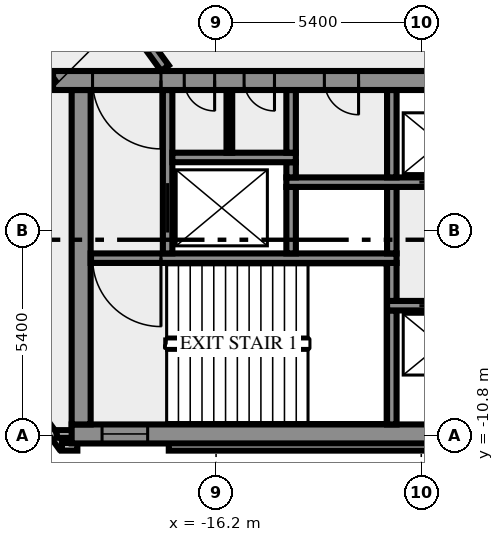
"""IFC4 building model, lengths in metres.
Left out: names, types, materials, properties, quantities, classifications, styles, units other than length and angle.
Written with IfcOpenShell. Run it as: python <this file> out.ifc"""

import sys

from ifc_helpers import new_model, si_unit, direction, frame, frame_2d, origin, place, context, subcontext, project, spatial, rectangle, extrude, element, fill, save


model = new_model("IFC4")
c1 = context("Model", 3, precision=1e-05, world=origin(), true_north=direction((0.0, 1.0)))
c2 = subcontext(c1, "Body", "Model", "MODEL_VIEW")
j1 = project(units=[si_unit("LENGTHUNIT", "METRE"), si_unit("PLANEANGLEUNIT", "RADIAN")], contexts=[c1])
p1 = place(None, origin())
s1 = spatial("IfcSite", under=j1, at=p1, CompositionType="ELEMENT")
p2 = place(p1, origin())
s2 = spatial("IfcBuilding", under=s1, at=p2, CompositionType="ELEMENT")
p3 = place(p2, frame((0.0, 0.0, 97.0)))
s3 = spatial("IfcBuildingStorey", under=s2, at=p3, CompositionType="ELEMENT", Elevation=97.0)
p4 = place(p3, frame((-21.833, -8.909, 0.0), z_axis=(0.0, 0.0, 1.0), x_axis=(0.587766567315, -0.809030569476, 0.0)))
e1 = element("IfcWall", 1, at=p4, inside=s3, PredefinedType="SOLIDWALL", context=c2, shape_type="SweptSolid", body=[
    extrude(rectangle(XDim=2.688, YDim=0.2, at=frame_2d((1.344, 0.0))), origin(), (0.0, 0.0, 1.0), 3.65),
])
p5 = place(p3, frame((-20.256, -11.088, 0.0), z_axis=(0.0, 0.0, 1.0), x_axis=(1.0, 0.0, 0.0)))
e2 = element("IfcWall", 2, at=p5, inside=s3, PredefinedType="SOLIDWALL", context=c2, shape_type="SweptSolid", body=[
    extrude(rectangle(XDim=0.406, YDim=0.2, at=frame_2d((0.203, 0.0))), origin(), (0.0, 0.0, 1.0), 3.65),
])
p6 = place(p3, frame((-17.444, -11.088, 0.0), z_axis=(0.0, 0.0, 1.0), x_axis=(1.0, 0.0, 0.0)))
e3 = element("IfcWall", 3, at=p6, inside=s3, PredefinedType="SOLIDWALL", context=c2, shape_type="SweptSolid", body=[
    extrude(rectangle(XDim=34.888, YDim=0.2, at=frame_2d((17.444, 0.0))), origin(), (0.0, 0.0, 1.0), 3.65),
])
p7 = place(p3, frame((-19.98, -10.75, 0.0), z_axis=(0.0, 0.0, 1.0), x_axis=(-1.0, 0.0, 0.0)))
e4 = element("IfcWall", 4, at=p7, inside=s3, PredefinedType="SOLIDWALL", context=c2, shape_type="SweptSolid", body=[
    extrude(rectangle(XDim=0.417, YDim=0.2, at=frame_2d((0.208, 0.0))), origin(), (0.0, 0.0, 1.0), 3.65),
])
p8 = place(p3, frame((-20.0, -10.75, 0.0), z_axis=(0.0, 0.0, 1.0), x_axis=(1.0, 0.0, 0.0)))
e5 = element("IfcWall", 5, at=p8, inside=s3, PredefinedType="SHEAR", context=c2, shape_type="SweptSolid", body=[
    extrude(rectangle(XDim=40.0, YDim=0.5, at=frame_2d((20.0, 0.0))), origin(), (0.0, 0.0, 1.0), 3.65),
])
p9 = place(p8, frame((0.8, 0.0, 1.0)))
e6 = element("IfcOpeningElement", 6, at=p9, cuts=e5, PredefinedType="OPENING", context=c2, shape_type="SweptSolid", body=[
    extrude(rectangle(XDim=1.2, YDim=1.2, at=frame_2d((0.6, 0.6))), frame((0.0, 0.26, 0.0), z_axis=(0.0, -1.0, 0.0), x_axis=(1.0, 0.0, 0.0)), (0.0, 0.0, 1.0), 0.52),
])
p10 = place(p8, frame((38.0, 0.0, 1.0)))
e7 = element("IfcOpeningElement", 7, at=p10, cuts=e5, PredefinedType="OPENING", context=c2, shape_type="SweptSolid", body=[
    extrude(rectangle(XDim=1.2, YDim=1.2, at=frame_2d((0.6, 0.6))), frame((0.0, 0.26, 0.0), z_axis=(0.0, -1.0, 0.0), x_axis=(1.0, 0.0, 0.0)), (0.0, 0.0, 1.0), 0.52),
])
p11 = place(p3, frame((-19.75, -10.5, 0.0), z_axis=(0.0, 0.0, 1.0), x_axis=(0.0, 1.0, 0.0)))
e8 = element("IfcWall", 8, at=p11, inside=s3, PredefinedType="SHEAR", context=c2, shape_type="SweptSolid", body=[
    extrude(rectangle(XDim=8.8, YDim=0.5, at=frame_2d((4.4, 0.0))), origin(), (0.0, 0.0, 1.0), 3.65),
])
p12 = place(p3, frame((-11.575, -10.5, 0.0), z_axis=(0.0, 0.0, 1.0), x_axis=(0.0, 1.0, 0.0)))
e9 = element("IfcWall", 9, at=p12, inside=s3, PredefinedType="SHEAR", context=c2, shape_type="SweptSolid", body=[
    extrude(rectangle(XDim=3.0, YDim=0.25, at=frame_2d((1.5, 0.0))), origin(), (0.0, 0.0, 1.0), 3.65),
])
p13 = place(p3, frame((11.7, -7.375, 0.0), z_axis=(0.0, 0.0, 1.0), x_axis=(-1.0, 0.0, 0.0)))
e10 = element("IfcWall", 10, at=p13, inside=s3, PredefinedType="SHEAR", context=c2, shape_type="SweptSolid", body=[
    extrude(rectangle(XDim=23.4, YDim=0.25, at=frame_2d((11.7, 0.0))), origin(), (0.0, 0.0, 1.0), 3.65),
])
p14 = place(p13, frame((21.45, 0.0, 0.0)))
e11 = element("IfcOpeningElement", 11, at=p14, cuts=e10, PredefinedType="OPENING", context=c2, shape_type="SweptSolid", body=[
    extrude(rectangle(XDim=1.1, YDim=2.1, at=frame_2d((0.55, 1.05))), frame((0.0, 0.135, 0.0), z_axis=(0.0, -1.0, 0.0), x_axis=(1.0, 0.0, 0.0)), (0.0, 0.0, 1.0), 0.27),
])
p15 = place(p13, frame((18.95, 0.0, 0.0)))
e12 = element("IfcOpeningElement", 12, at=p15, cuts=e10, PredefinedType="OPENING", context=c2, shape_type="SweptSolid", body=[
    extrude(rectangle(XDim=1.1, YDim=2.1, at=frame_2d((0.55, 1.05))), frame((0.0, 0.135, 0.0), z_axis=(0.0, -1.0, 0.0), x_axis=(1.0, 0.0, 0.0)), (0.0, 0.0, 1.0), 0.27),
])
p16 = place(p13, frame((16.45, 0.0, 0.0)))
e13 = element("IfcOpeningElement", 13, at=p16, cuts=e10, PredefinedType="OPENING", context=c2, shape_type="SweptSolid", body=[
    extrude(rectangle(XDim=1.1, YDim=2.1, at=frame_2d((0.55, 1.05))), frame((0.0, 0.135, 0.0), z_axis=(0.0, -1.0, 0.0), x_axis=(1.0, 0.0, 0.0)), (0.0, 0.0, 1.0), 0.27),
])
p17 = place(p13, frame((14.65, 0.0, 0.0)))
e14 = element("IfcOpeningElement", 14, at=p17, cuts=e10, PredefinedType="OPENING", context=c2, shape_type="SweptSolid", body=[
    extrude(rectangle(XDim=0.8, YDim=2.1, at=frame_2d((0.4, 1.05))), frame((0.0, 0.135, 0.0), z_axis=(0.0, -1.0, 0.0), x_axis=(1.0, 0.0, 0.0)), (0.0, 0.0, 1.0), 0.27),
])
p18 = place(p13, frame((12.8, 0.0, 0.0)))
e15 = element("IfcOpeningElement", 15, at=p18, cuts=e10, PredefinedType="OPENING", context=c2, shape_type="SweptSolid", body=[
    extrude(rectangle(XDim=0.9, YDim=2.1, at=frame_2d((0.45, 1.05))), frame((0.0, 0.135, 0.0), z_axis=(0.0, -1.0, 0.0), x_axis=(1.0, 0.0, 0.0)), (0.0, 0.0, 1.0), 0.27),
])
p19 = place(p13, frame((10.7, 0.0, 0.0)))
e16 = element("IfcOpeningElement", 16, at=p19, cuts=e10, PredefinedType="OPENING", context=c2, shape_type="SweptSolid", body=[
    extrude(rectangle(XDim=0.9, YDim=2.1, at=frame_2d((0.45, 1.05))), frame((0.0, 0.135, 0.0), z_axis=(0.0, -1.0, 0.0), x_axis=(1.0, 0.0, 0.0)), (0.0, 0.0, 1.0), 0.27),
])
p20 = place(p3, frame((-11.575, -7.25, 0.0), z_axis=(0.0, 0.0, 1.0), x_axis=(0.0, 1.0, 0.0)))
e17 = element("IfcWall", 17, at=p20, inside=s3, PredefinedType="SHEAR", context=c2, shape_type="SweptSolid", body=[
    extrude(rectangle(XDim=1.0, YDim=0.25, at=frame_2d((0.5, 0.0))), origin(), (0.0, 0.0, 1.0), 3.65),
])
p21 = place(p3, frame((-11.45, -6.125, 0.0), z_axis=(0.0, 0.0, 1.0), x_axis=(-1.0, 0.0, 0.0)))
e18 = element("IfcWall", 18, at=p21, inside=s3, PredefinedType="SHEAR", context=c2, shape_type="SweptSolid", body=[
    extrude(rectangle(XDim=8.05, YDim=0.25, at=frame_2d((4.025, 0.0))), origin(), (0.0, 0.0, 1.0), 3.65),
])
p22 = place(p21, frame((6.2, 0.0, 0.0)))
e19 = element("IfcOpeningElement", 19, at=p22, cuts=e18, PredefinedType="OPENING", context=c2, shape_type="SweptSolid", body=[
    extrude(rectangle(XDim=1.8, YDim=2.1, at=frame_2d((0.9, 1.05))), frame((0.0, 0.135, 0.0), z_axis=(0.0, -1.0, 0.0), x_axis=(1.0, 0.0, 0.0)), (0.0, 0.0, 1.0), 0.27),
])
p23 = place(p3, frame((-17.475, -6.0, 0.0), z_axis=(0.0, 0.0, 1.0), x_axis=(0.0, 1.0, 0.0)))
e20 = element("IfcWall", 20, at=p23, inside=s3, PredefinedType="SHEAR", context=c2, shape_type="SweptSolid", body=[
    extrude(rectangle(XDim=4.3, YDim=0.25, at=frame_2d((2.15, 0.0))), origin(), (0.0, 0.0, 1.0), 3.65),
])
p24 = place(p23, frame((0.55, 0.0, 0.0)))
e21 = element("IfcOpeningElement", 21, at=p24, cuts=e20, PredefinedType="OPENING", context=c2, shape_type="SweptSolid", body=[
    extrude(rectangle(XDim=1.3, YDim=2.1, at=frame_2d((0.65, 1.05))), frame((0.0, 0.135, 0.0), z_axis=(0.0, -1.0, 0.0), x_axis=(1.0, 0.0, 0.0)), (0.0, 0.0, 1.0), 0.27),
])
for number, where, z_axis, x_axis in (
    (22, (-14.225, -6.0, 0.0), (0.0, 0.0, 1.0), (0.0, 1.0, 0.0)),
    (23, (-11.575, -6.0, 0.0), (0.0, 0.0, 1.0), (0.0, 1.0, 0.0)),
):
    element("IfcWall", number, at=place(p3, frame(where, z_axis=z_axis, x_axis=x_axis)), inside=s3, PredefinedType="SHEAR", context=c2, shape_type="SweptSolid", body=[
        extrude(rectangle(XDim=1.75, YDim=0.25, at=frame_2d((0.875, 0.0))), origin(), (0.0, 0.0, 1.0), 3.65),
    ])
p25 = place(p3, frame((-14.35, -4.125, 0.0), z_axis=(0.0, 0.0, 1.0), x_axis=(1.0, 0.0, 0.0)))
e24 = element("IfcWall", 24, at=p25, inside=s3, PredefinedType="SHEAR", context=c2, shape_type="SweptSolid", body=[
    extrude(rectangle(XDim=12.7, YDim=0.25, at=frame_2d((6.35, 0.0))), origin(), (0.0, 0.0, 1.0), 3.65),
])
p26 = place(p25, frame((3.5, 0.0, 0.0)))
e25 = element("IfcOpeningElement", 25, at=p26, cuts=e24, PredefinedType="OPENING", context=c2, shape_type="SweptSolid", body=[
    extrude(rectangle(XDim=1.1, YDim=2.1, at=frame_2d((0.55, 1.05))), frame((0.0, 0.135, 0.0), z_axis=(0.0, -1.0, 0.0), x_axis=(1.0, 0.0, 0.0)), (0.0, 0.0, 1.0), 0.27),
])
p27 = place(p25, frame((6.0, 0.0, 0.0)))
e26 = element("IfcOpeningElement", 26, at=p27, cuts=e24, PredefinedType="OPENING", context=c2, shape_type="SweptSolid", body=[
    extrude(rectangle(XDim=1.1, YDim=2.1, at=frame_2d((0.55, 1.05))), frame((0.0, 0.135, 0.0), z_axis=(0.0, -1.0, 0.0), x_axis=(1.0, 0.0, 0.0)), (0.0, 0.0, 1.0), 0.27),
])
p28 = place(p25, frame((8.5, 0.0, 0.0)))
e27 = element("IfcOpeningElement", 27, at=p28, cuts=e24, PredefinedType="OPENING", context=c2, shape_type="SweptSolid", body=[
    extrude(rectangle(XDim=1.1, YDim=2.1, at=frame_2d((0.55, 1.05))), frame((0.0, 0.135, 0.0), z_axis=(0.0, -1.0, 0.0), x_axis=(1.0, 0.0, 0.0)), (0.0, 0.0, 1.0), 0.27),
])
p29 = place(p3, frame((-14.225, -4.0, 0.0), z_axis=(0.0, 0.0, 1.0), x_axis=(0.0, 1.0, 0.0)))
e28 = element("IfcWall", 28, at=p29, inside=s3, PredefinedType="SHEAR", context=c2, shape_type="SweptSolid", body=[
    extrude(rectangle(XDim=0.4, YDim=0.25, at=frame_2d((0.2, 0.0))), origin(), (0.0, 0.0, 1.0), 3.65),
])
p30 = place(p3, frame((-11.575, -4.0, 0.0), z_axis=(0.0, 0.0, 1.0), x_axis=(0.0, 1.0, 0.0)))
e29 = element("IfcWall", 29, at=p30, inside=s3, PredefinedType="SHEAR", context=c2, shape_type="SweptSolid", body=[
    extrude(rectangle(XDim=2.3, YDim=0.25, at=frame_2d((1.15, 0.0))), origin(), (0.0, 0.0, 1.0), 3.65),
])
p31 = place(p3, frame((-17.35, -3.475, 0.0), z_axis=(0.0, 0.0, 1.0), x_axis=(1.0, 0.0, 0.0)))
e30 = element("IfcWall", 30, at=p31, inside=s3, PredefinedType="SHEAR", context=c2, shape_type="SweptSolid", body=[
    extrude(rectangle(XDim=3.25, YDim=0.25, at=frame_2d((1.625, 0.0))), origin(), (0.0, 0.0, 1.0), 3.65),
])
p32 = place(p3, frame((-15.85, -3.35, 0.0), z_axis=(0.0, 0.0, 1.0), x_axis=(0.0, 1.0, 0.0)))
e31 = element("IfcWall", 31, at=p32, inside=s3, PredefinedType="PARTITIONING", context=c2, shape_type="SweptSolid", body=[
    extrude(rectangle(XDim=1.65, YDim=0.15, at=frame_2d((0.825, 0.0))), origin(), (0.0, 0.0, 1.0), 3.65),
])
p33 = place(p3, frame((-14.225, -3.35, 0.0), z_axis=(0.0, 0.0, 1.0), x_axis=(0.0, 1.0, 0.0)))
e32 = element("IfcWall", 32, at=p33, inside=s3, PredefinedType="SHEAR", context=c2, shape_type="SweptSolid", body=[
    extrude(rectangle(XDim=1.65, YDim=0.25, at=frame_2d((0.825, 0.0))), origin(), (0.0, 0.0, 1.0), 3.65),
])
p34 = place(p3, frame((20.49, -1.45, 0.0), z_axis=(0.0, 0.0, 1.0), x_axis=(-1.0, 0.0, 0.0)))
e33 = element("IfcWall", 33, at=p34, inside=s3, PredefinedType="SHEAR", context=c2, shape_type="SweptSolid", body=[
    extrude(rectangle(XDim=40.98, YDim=0.5, at=frame_2d((20.49, 0.0))), origin(), (0.0, 0.0, 1.0), 3.65),
])
p35 = place(p34, frame((38.14, 0.0, 0.0)))
e34 = element("IfcOpeningElement", 34, at=p35, cuts=e33, PredefinedType="OPENING", context=c2, shape_type="SweptSolid", body=[
    extrude(rectangle(XDim=1.8, YDim=2.1, at=frame_2d((0.9, 1.05))), frame((0.0, 0.26, 0.0), z_axis=(0.0, -1.0, 0.0), x_axis=(1.0, 0.0, 0.0)), (0.0, 0.0, 1.0), 0.52),
])
p36 = place(p34, frame((36.728, 0.0, 0.0)))
e35 = element("IfcOpeningElement", 35, at=p36, cuts=e33, PredefinedType="OPENING", context=c2, shape_type="SweptSolid", body=[
    extrude(rectangle(XDim=0.8, YDim=2.1, at=frame_2d((0.4, 1.05))), frame((0.0, 0.26, 0.0), z_axis=(0.0, -1.0, 0.0), x_axis=(1.0, 0.0, 0.0)), (0.0, 0.0, 1.0), 0.52),
])
p37 = place(p34, frame((35.153, 0.0, 0.0)))
e36 = element("IfcOpeningElement", 36, at=p37, cuts=e33, PredefinedType="OPENING", context=c2, shape_type="SweptSolid", body=[
    extrude(rectangle(XDim=0.8, YDim=2.1, at=frame_2d((0.4, 1.05))), frame((0.0, 0.26, 0.0), z_axis=(0.0, -1.0, 0.0), x_axis=(1.0, 0.0, 0.0)), (0.0, 0.0, 1.0), 0.52),
])
p38 = place(p34, frame((32.94, 0.0, 0.0)))
e37 = element("IfcOpeningElement", 37, at=p38, cuts=e33, PredefinedType="OPENING", context=c2, shape_type="SweptSolid", body=[
    extrude(rectangle(XDim=0.9, YDim=2.1, at=frame_2d((0.45, 1.05))), frame((0.0, 0.26, 0.0), z_axis=(0.0, -1.0, 0.0), x_axis=(1.0, 0.0, 0.0)), (0.0, 0.0, 1.0), 0.52),
])
p39 = place(p34, frame((19.59, 0.0, 0.0)))
e38 = element("IfcOpeningElement", 38, at=p39, cuts=e33, PredefinedType="OPENING", context=c2, shape_type="SweptSolid", body=[
    extrude(rectangle(XDim=2.0, YDim=2.1, at=frame_2d((1.0, 1.05))), frame((0.0, 0.26, 0.0), z_axis=(0.0, -1.0, 0.0), x_axis=(1.0, 0.0, 0.0)), (0.0, 0.0, 1.0), 0.52),
])
p40 = place(p34, frame((7.14, 0.0, 0.0)))
e39 = element("IfcOpeningElement", 39, at=p40, cuts=e33, PredefinedType="OPENING", context=c2, shape_type="SweptSolid", body=[
    extrude(rectangle(XDim=0.9, YDim=2.1, at=frame_2d((0.45, 1.05))), frame((0.0, 0.26, 0.0), z_axis=(0.0, -1.0, 0.0), x_axis=(1.0, 0.0, 0.0)), (0.0, 0.0, 1.0), 0.52),
])
p41 = place(p34, frame((4.19, 0.0, 0.0)))
e40 = element("IfcOpeningElement", 40, at=p41, cuts=e33, PredefinedType="OPENING", context=c2, shape_type="SweptSolid", body=[
    extrude(rectangle(XDim=0.9, YDim=2.1, at=frame_2d((0.45, 1.05))), frame((0.0, 0.26, 0.0), z_axis=(0.0, -1.0, 0.0), x_axis=(1.0, 0.0, 0.0)), (0.0, 0.0, 1.0), 0.52),
])
p42 = place(p34, frame((1.04, 0.0, 0.0)))
e41 = element("IfcOpeningElement", 41, at=p42, cuts=e33, PredefinedType="OPENING", context=c2, shape_type="SweptSolid", body=[
    extrude(rectangle(XDim=1.8, YDim=2.1, at=frame_2d((0.9, 1.05))), frame((0.0, 0.26, 0.0), z_axis=(0.0, -1.0, 0.0), x_axis=(1.0, 0.0, 0.0)), (0.0, 0.0, 1.0), 0.52),
])
p43 = place(p3, frame((-20.531, -1.523, 0.0), z_axis=(0.0, 0.0, 1.0), x_axis=(-0.587784593204, 0.809017473231, 0.0)))
e42 = element("IfcWall", 42, at=p43, inside=s3, PredefinedType="SOLIDWALL", context=c2, shape_type="SweptSolid", body=[
    extrude(rectangle(XDim=44.67, YDim=0.25, at=frame_2d((22.335, 0.0))), origin(), (0.0, 0.0, 1.0), 3.65),
])
p44 = place(p43, frame((43.296, 0.0, 0.0)))
e43 = element("IfcOpeningElement", 43, at=p44, cuts=e42, PredefinedType="OPENING", context=c2, shape_type="SweptSolid", body=[
    extrude(rectangle(XDim=0.9, YDim=2.1, at=frame_2d((0.45, 1.05))), frame((0.0, 0.135, 0.0), z_axis=(0.0, -1.0, 0.0), x_axis=(1.0, 0.0, 0.0)), (0.0, 0.0, 1.0), 0.27),
])
p45 = place(p43, frame((15.916, 0.0, 0.0)))
e44 = element("IfcOpeningElement", 44, at=p45, cuts=e42, PredefinedType="OPENING", context=c2, shape_type="SweptSolid", body=[
    extrude(rectangle(XDim=0.9, YDim=2.1, at=frame_2d((0.45, 1.05))), frame((0.0, 0.135, 0.0), z_axis=(0.0, -1.0, 0.0), x_axis=(1.0, 0.0, 0.0)), (0.0, 0.0, 1.0), 0.27),
])
p46 = place(p43, frame((33.116, 0.0, 0.0)))
e45 = element("IfcOpeningElement", 45, at=p46, cuts=e42, PredefinedType="OPENING", context=c2, shape_type="SweptSolid", body=[
    extrude(rectangle(XDim=1.0, YDim=2.1, at=frame_2d((0.5, 1.05))), frame((0.0, 0.135, 0.0), z_axis=(0.0, -1.0, 0.0), x_axis=(1.0, 0.0, 0.0)), (0.0, 0.0, 1.0), 0.27),
])
p47 = place(p43, frame((14.216, 0.0, 0.0)))
e46 = element("IfcOpeningElement", 46, at=p47, cuts=e42, PredefinedType="OPENING", context=c2, shape_type="SweptSolid", body=[
    extrude(rectangle(XDim=1.0, YDim=2.1, at=frame_2d((0.5, 1.05))), frame((0.0, 0.135, 0.0), z_axis=(0.0, -1.0, 0.0), x_axis=(1.0, 0.0, 0.0)), (0.0, 0.0, 1.0), 0.27),
])
p48 = place(p3, frame((-37.232, 25.972, 0.0), z_axis=(0.0, 0.0, 1.0), x_axis=(0.587786323093, -0.809016216391, 0.0)))
e47 = element("IfcWall", 47, at=p48, inside=s3, PredefinedType="SOLIDWALL", context=c2, shape_type="SweptSolid", body=[
    extrude(rectangle(XDim=33.493, YDim=0.25, at=frame_2d((16.747, 0.0))), origin(), (0.0, 0.0, 1.0), 3.65),
])
p49 = place(p48, frame((13.185, 0.0, 0.0)))
e48 = element("IfcOpeningElement", 48, at=p49, cuts=e47, PredefinedType="OPENING", context=c2, shape_type="SweptSolid", body=[
    extrude(rectangle(XDim=1.2, YDim=2.1, at=frame_2d((0.6, 1.05))), frame((0.0, 0.135, 0.0), z_axis=(0.0, -1.0, 0.0), x_axis=(1.0, 0.0, 0.0)), (0.0, 0.0, 1.0), 0.27),
])
p50 = place(p48, frame((29.152, 0.0, 0.0)))
e49 = element("IfcOpeningElement", 49, at=p50, cuts=e47, PredefinedType="OPENING", context=c2, shape_type="SweptSolid", body=[
    extrude(rectangle(XDim=0.9, YDim=2.1, at=frame_2d((0.45, 1.05))), frame((0.0, 0.135, 0.0), z_axis=(0.0, -1.0, 0.0), x_axis=(1.0, 0.0, 0.0)), (0.0, 0.0, 1.0), 0.27),
])
p51 = place(p9, origin())
e50 = element("IfcWindow", 50, at=p51, inside=s3, PartitioningType="SINGLE_PANEL", PredefinedType="WINDOW", context=c2, shape_type="SweptSolid", body=[
    extrude(rectangle(XDim=1.2, YDim=1.2, at=frame_2d((0.6, 0.6))), frame((0.0, 0.03, 0.0), z_axis=(0.0, -1.0, 0.0), x_axis=(1.0, 0.0, 0.0)), (0.0, 0.0, 1.0), 0.06),
])
fill(e6, e50)
p52 = place(p14, origin())
e51 = element("IfcDoor", 51, at=p52, inside=s3, OperationType="DOUBLE_DOOR_SLIDING", PredefinedType="DOOR", context=c2, shape_type="SweptSolid", body=[
    extrude(rectangle(XDim=1.1, YDim=2.1, at=frame_2d((0.55, 1.05))), frame((0.0, 0.025, 0.0), z_axis=(0.0, -1.0, 0.0), x_axis=(1.0, 0.0, 0.0)), (0.0, 0.0, 1.0), 0.05),
])
fill(e11, e51)
p53 = place(p22, origin())
e52 = element("IfcDoor", 52, at=p53, inside=s3, OperationType="DOUBLE_DOOR_SINGLE_SWING", PredefinedType="DOOR", context=c2, shape_type="SweptSolid", body=[
    extrude(rectangle(XDim=1.8, YDim=2.1, at=frame_2d((0.9, 1.05))), frame((0.0, 0.025, 0.0), z_axis=(0.0, -1.0, 0.0), x_axis=(1.0, 0.0, 0.0)), (0.0, 0.0, 1.0), 0.05),
])
fill(e19, e52)
p54 = place(p24, origin())
e53 = element("IfcDoor", 53, at=p54, inside=s3, OperationType="DOUBLE_DOOR_SLIDING", PredefinedType="DOOR", context=c2, shape_type="SweptSolid", body=[
    extrude(rectangle(XDim=1.3, YDim=2.1, at=frame_2d((0.65, 1.05))), frame((0.0, 0.025, 0.0), z_axis=(0.0, -1.0, 0.0), x_axis=(1.0, 0.0, 0.0)), (0.0, 0.0, 1.0), 0.05),
])
fill(e21, e53)
p55 = place(p26, origin())
e54 = element("IfcDoor", 54, at=p55, inside=s3, OperationType="DOUBLE_DOOR_SLIDING", PredefinedType="DOOR", context=c2, shape_type="SweptSolid", body=[
    extrude(rectangle(XDim=1.1, YDim=2.1, at=frame_2d((0.55, 1.05))), frame((0.0, 0.025, 0.0), z_axis=(0.0, -1.0, 0.0), x_axis=(1.0, 0.0, 0.0)), (0.0, 0.0, 1.0), 0.05),
])
fill(e25, e54)
p56 = place(p35, origin())
e55 = element("IfcDoor", 55, at=p56, inside=s3, OperationType="DOUBLE_DOOR_SINGLE_SWING", PredefinedType="DOOR", context=c2, shape_type="SweptSolid", body=[
    extrude(rectangle(XDim=1.8, YDim=2.1, at=frame_2d((0.9, 1.05))), frame((0.0, 0.025, 0.0), z_axis=(0.0, -1.0, 0.0), x_axis=(1.0, 0.0, 0.0)), (0.0, 0.0, 1.0), 0.05),
])
fill(e34, e55)
p57 = place(p36, origin())
e56 = element("IfcDoor", 56, at=p57, inside=s3, OperationType="SINGLE_SWING_RIGHT", PredefinedType="DOOR", context=c2, shape_type="SweptSolid", body=[
    extrude(rectangle(XDim=0.8, YDim=2.1, at=frame_2d((0.4, 1.05))), frame((0.0, 0.025, 0.0), z_axis=(0.0, -1.0, 0.0), x_axis=(1.0, 0.0, 0.0)), (0.0, 0.0, 1.0), 0.05),
])
fill(e35, e56)
p58 = place(p37, origin())
e57 = element("IfcDoor", 57, at=p58, inside=s3, OperationType="SINGLE_SWING_RIGHT", PredefinedType="DOOR", context=c2, shape_type="SweptSolid", body=[
    extrude(rectangle(XDim=0.8, YDim=2.1, at=frame_2d((0.4, 1.05))), frame((0.0, 0.025, 0.0), z_axis=(0.0, -1.0, 0.0), x_axis=(1.0, 0.0, 0.0)), (0.0, 0.0, 1.0), 0.05),
])
fill(e36, e57)
p59 = place(p38, origin())
e58 = element("IfcDoor", 58, at=p59, inside=s3, OperationType="SINGLE_SWING_RIGHT", PredefinedType="DOOR", context=c2, shape_type="SweptSolid", body=[
    extrude(rectangle(XDim=0.9, YDim=2.1, at=frame_2d((0.45, 1.05))), frame((0.0, 0.025, 0.0), z_axis=(0.0, -1.0, 0.0), x_axis=(1.0, 0.0, 0.0)), (0.0, 0.0, 1.0), 0.05),
])
fill(e37, e58)
save(model, sys.argv[1])
